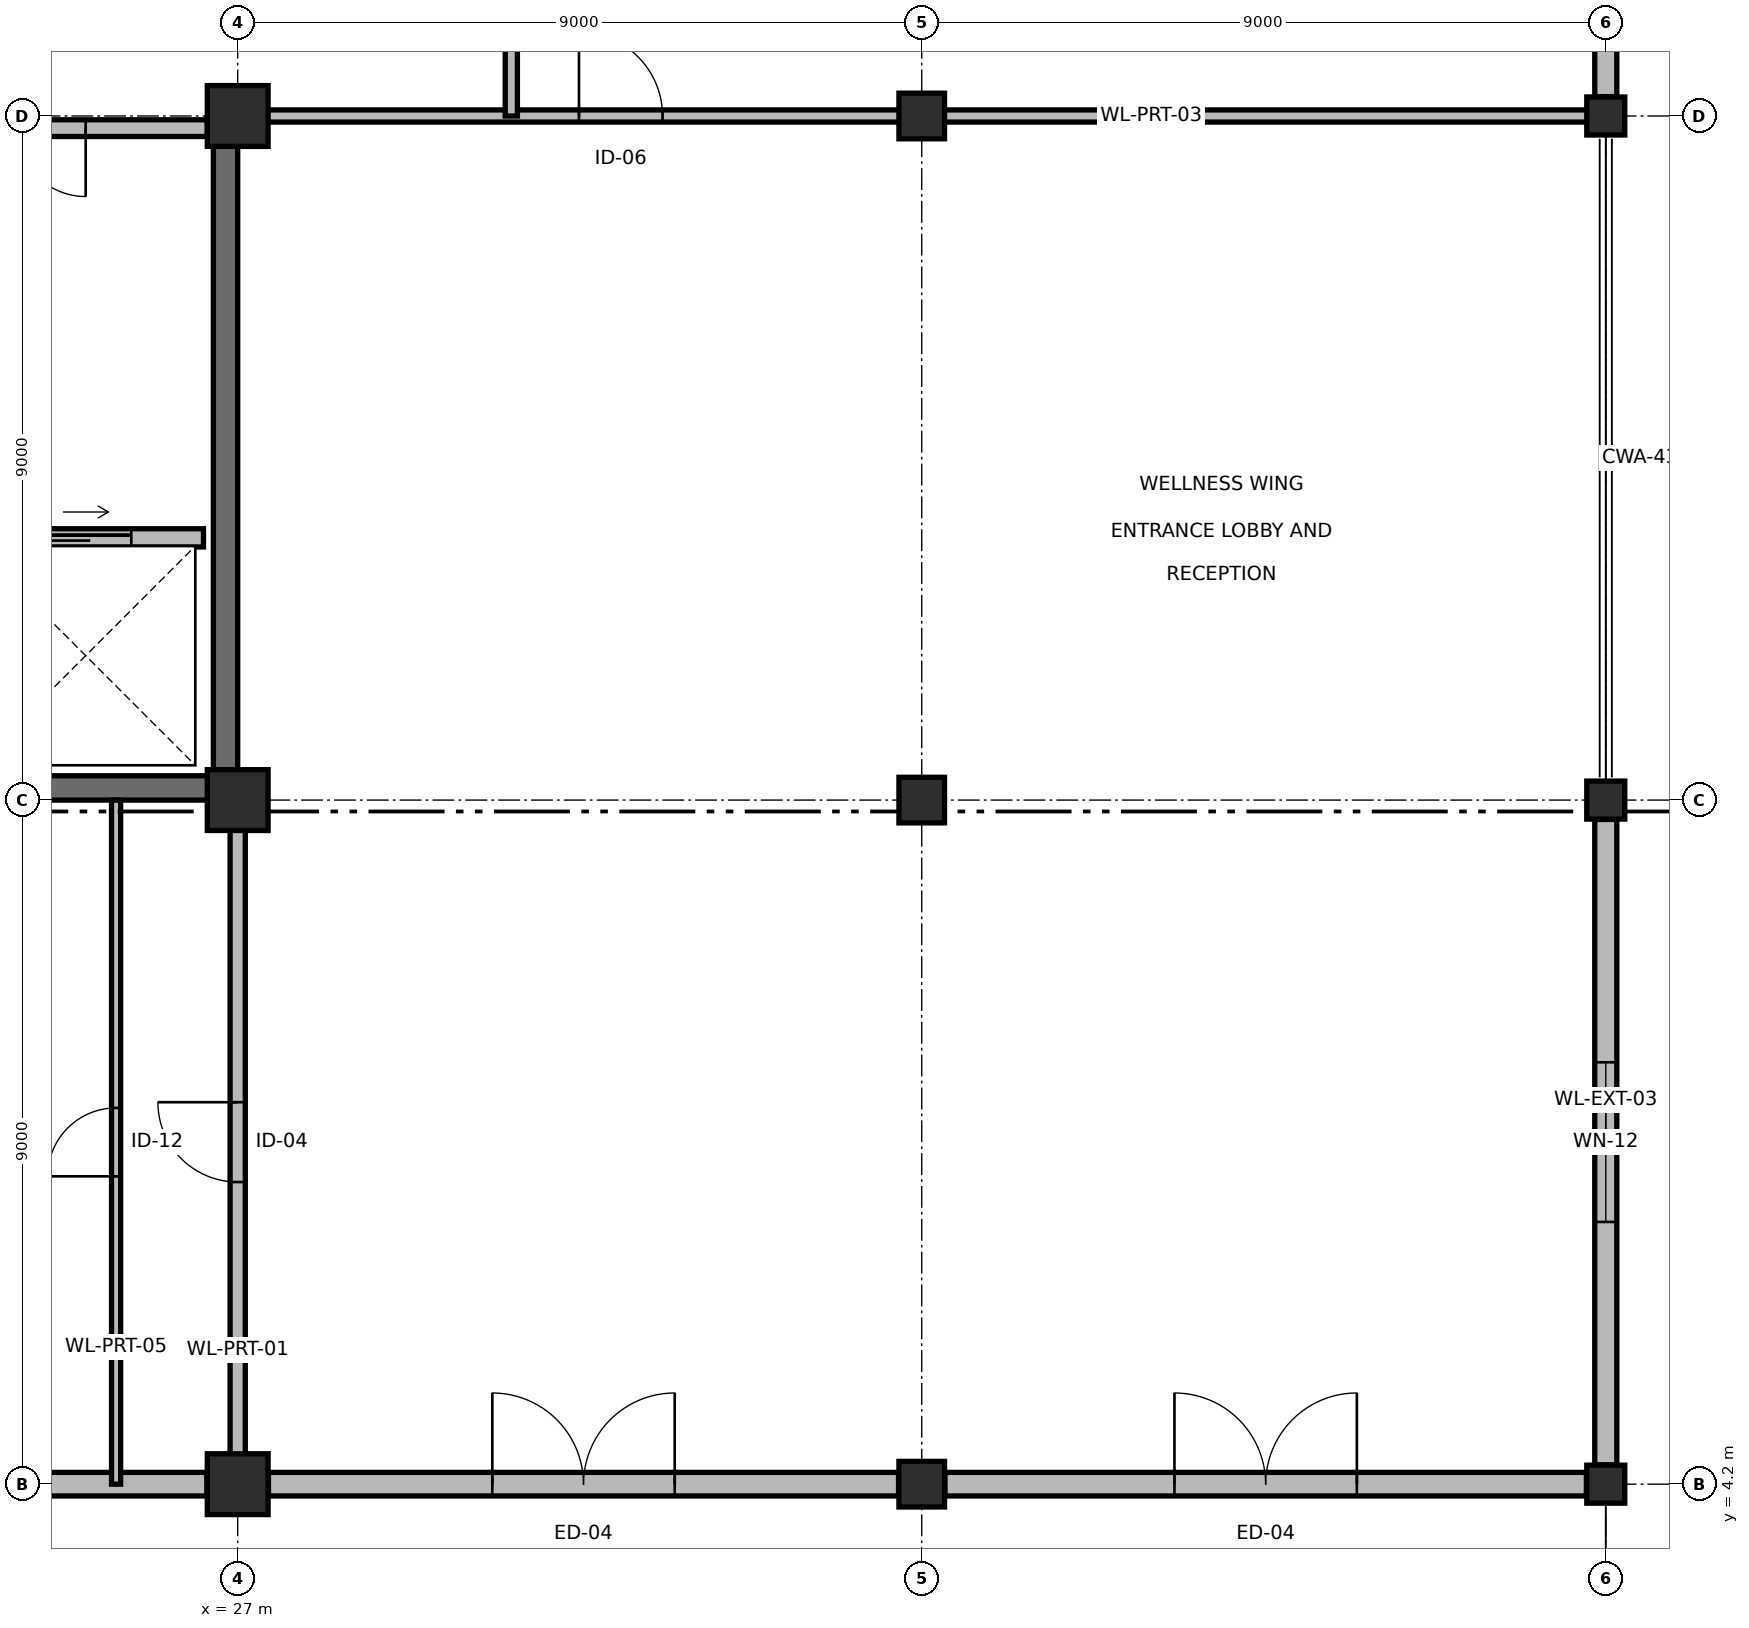
"""IFC4 building model, lengths in metres.
Left out: names, types, materials, properties, quantities, classifications, styles, units other than length and angle.
Written with IfcOpenShell. Run it as: python <this file> out.ifc"""

import sys

from ifc_helpers import new_model, si_unit, direction, frame, frame_2d, origin, origin_2d, place, context, subcontext, project, spatial, rectangle, extrude, element, fill, save


model = new_model("IFC4")
c1 = context("Model", 3, precision=1e-05, world=origin(), true_north=direction((0.0, 1.0)))
c2 = subcontext(c1, "Body", "Model", "MODEL_VIEW")
j1 = project(units=[si_unit("LENGTHUNIT", "METRE"), si_unit("PLANEANGLEUNIT", "RADIAN")], contexts=[c1])
p1 = place(None, origin())
s1 = spatial("IfcSite", under=j1, at=p1, CompositionType="ELEMENT")
p2 = place(p1, origin())
s2 = spatial("IfcBuilding", under=s1, at=p2, CompositionType="ELEMENT")
p3 = place(p2, origin())
s3 = spatial("IfcBuildingStorey", under=s2, at=p3, CompositionType="ELEMENT", Elevation=0.0)
for number, where, z_axis, x_axis in (
    (1, (27.0, 4.2, 0.0), (0.0, 0.0, 1.0), (1.0, 0.0, 0.0)),
    (2, (27.0, 13.2, 0.0), (0.0, 0.0, 1.0), (1.0, 0.0, 0.0)),
    (3, (27.0, 22.2, 0.0), (0.0, 0.0, 1.0), (1.0, 0.0, 0.0)),
):
    element("IfcColumn", number, at=place(p3, frame(where, z_axis=z_axis, x_axis=x_axis)), inside=s3, PredefinedType="COLUMN", context=c2, shape_type="SweptSolid", body=[
        extrude(rectangle(XDim=0.8, YDim=0.8, at=origin_2d()), origin(), (0.0, 0.0, 1.0), 4.8),
    ])
for number, where, z_axis, x_axis in (
    (4, (36.0, 4.2, 0.0), (0.0, 0.0, 1.0), (1.0, 0.0, 0.0)),
    (5, (36.0, 13.2, 0.0), (0.0, 0.0, 1.0), (1.0, 0.0, 0.0)),
    (6, (36.0, 22.2, 0.0), (0.0, 0.0, 1.0), (1.0, 0.0, 0.0)),
):
    element("IfcColumn", number, at=place(p3, frame(where, z_axis=z_axis, x_axis=x_axis)), inside=s3, PredefinedType="COLUMN", context=c2, shape_type="SweptSolid", body=[
        extrude(rectangle(XDim=0.6, YDim=0.6, at=origin_2d()), origin(), (0.0, 0.0, 1.0), 4.8),
    ])
for number, where, z_axis, x_axis in (
    (7, (45.0, 4.2, 0.0), (0.0, 0.0, 1.0), (1.0, 0.0, 0.0)),
    (8, (45.0, 13.2, 0.0), (0.0, 0.0, 1.0), (1.0, 0.0, 0.0)),
    (9, (45.0, 22.2, 0.0), (0.0, 0.0, 1.0), (1.0, 0.0, 0.0)),
):
    element("IfcColumn", number, at=place(p3, frame(where, z_axis=z_axis, x_axis=x_axis)), inside=s3, PredefinedType="COLUMN", context=c2, shape_type="SweptSolid", body=[
        extrude(rectangle(XDim=0.5, YDim=0.5, at=origin_2d()), origin(), (0.0, 0.0, 1.0), 4.8),
    ])
p4 = place(p3, frame((21.8, 13.36, 0.0), z_axis=(0.0, 0.0, 1.0), x_axis=(1.0, 0.0, 0.0)))
e10 = element("IfcWall", 10, at=p4, inside=s3, PredefinedType="SHEAR", context=c2, shape_type="SweptSolid", body=[
    extrude(rectangle(XDim=5.2, YDim=0.32, at=frame_2d((2.6, 0.0))), origin(), (0.0, 0.0, 1.0), 4.8),
])
p5 = place(p3, frame((26.84, 13.52, 0.0), z_axis=(0.0, 0.0, 1.0), x_axis=(0.0, 1.0, 0.0)))
e11 = element("IfcWall", 11, at=p5, inside=s3, PredefinedType="SHEAR", context=c2, shape_type="SweptSolid", body=[
    extrude(rectangle(XDim=8.48, YDim=0.32, at=frame_2d((4.24, 0.0))), origin(), (0.0, 0.0, 1.0), 4.8),
])
p6 = place(p3, frame((26.595, 4.2, 0.0), z_axis=(0.0, 0.0, 1.0), x_axis=(-1.0, 0.0, 0.0)))
e12 = element("IfcWall", 12, at=p6, inside=s3, PredefinedType="SOLIDWALL", context=c2, shape_type="SweptSolid", body=[
    extrude(rectangle(XDim=8.19, YDim=0.31, at=frame_2d((4.095, 0.0))), origin(), (0.0, 0.0, 1.0), 3.785),
])
p7 = place(p6, frame((2.595, 0.0, 0.85)))
e13 = element("IfcOpeningElement", 13, at=p7, cuts=e12, PredefinedType="OPENING", context=c2, shape_type="SweptSolid", body=[
    extrude(rectangle(XDim=3.0, YDim=2.0, at=frame_2d((1.5, 1.0))), frame((0.0, 0.165, 0.0), z_axis=(0.0, -1.0, 0.0), x_axis=(1.0, 0.0, 0.0)), (0.0, 0.0, 1.0), 0.33),
])
p8 = place(p3, frame((35.695, 4.2, 0.0), z_axis=(0.0, 0.0, 1.0), x_axis=(-1.0, 0.0, 0.0)))
e14 = element("IfcWall", 14, at=p8, inside=s3, PredefinedType="SOLIDWALL", context=c2, shape_type="SweptSolid", body=[
    extrude(rectangle(XDim=8.29, YDim=0.31, at=frame_2d((4.145, 0.0))), origin(), (0.0, 0.0, 1.0), 3.785),
])
p9 = place(p8, frame((2.945, 0.0, 0.0)))
e15 = element("IfcOpeningElement", 15, at=p9, cuts=e14, PredefinedType="OPENING", context=c2, shape_type="SweptSolid", body=[
    extrude(rectangle(XDim=2.4, YDim=2.4, at=frame_2d((1.2, 1.2))), frame((0.0, 0.165, 0.0), z_axis=(0.0, -1.0, 0.0), x_axis=(1.0, 0.0, 0.0)), (0.0, 0.0, 1.0), 0.33),
])
p10 = place(p3, frame((44.745, 4.2, 0.0), z_axis=(0.0, 0.0, 1.0), x_axis=(-1.0, 0.0, 0.0)))
e16 = element("IfcWall", 16, at=p10, inside=s3, PredefinedType="SOLIDWALL", context=c2, shape_type="SweptSolid", body=[
    extrude(rectangle(XDim=8.44, YDim=0.31, at=frame_2d((4.22, 0.0))), origin(), (0.0, 0.0, 1.0), 3.785),
])
p11 = place(p10, frame((3.02, 0.0, 0.0)))
e17 = element("IfcOpeningElement", 17, at=p11, cuts=e16, PredefinedType="OPENING", context=c2, shape_type="SweptSolid", body=[
    extrude(rectangle(XDim=2.4, YDim=2.4, at=frame_2d((1.2, 1.2))), frame((0.0, 0.165, 0.0), z_axis=(0.0, -1.0, 0.0), x_axis=(1.0, 0.0, 0.0)), (0.0, 0.0, 1.0), 0.33),
])
p12 = place(p3, frame((45.0, 12.945, 0.0), z_axis=(0.0, 0.0, 1.0), x_axis=(0.0, -1.0, 0.0)))
e18 = element("IfcWall", 18, at=p12, inside=s3, PredefinedType="SOLIDWALL", context=c2, shape_type="SweptSolid", body=[
    extrude(rectangle(XDim=8.49, YDim=0.29, at=frame_2d((4.245, 0.0))), origin(), (0.0, 0.0, 1.0), 3.785),
])
p13 = place(p12, frame((3.195, 0.0, 0.95)))
e19 = element("IfcOpeningElement", 19, at=p13, cuts=e18, PredefinedType="OPENING", context=c2, shape_type="SweptSolid", body=[
    extrude(rectangle(XDim=2.1, YDim=1.5, at=frame_2d((1.05, 0.75))), frame((0.0, 0.155, 0.0), z_axis=(0.0, -1.0, 0.0), x_axis=(1.0, 0.0, 0.0)), (0.0, 0.0, 1.0), 0.31),
])
p14 = place(p3, frame((45.0, 28.545, 0.0), z_axis=(0.0, 0.0, 1.0), x_axis=(0.0, -1.0, 0.0)))
e20 = element("IfcWall", 20, at=p14, inside=s3, PredefinedType="SOLIDWALL", context=c2, shape_type="SweptSolid", body=[
    extrude(rectangle(XDim=6.09, YDim=0.29, at=frame_2d((3.045, 0.0))), origin(), (0.0, 0.0, 1.0), 3.785),
])
p15 = place(p14, frame((1.995, 0.0, 0.0)))
e21 = element("IfcOpeningElement", 21, at=p15, cuts=e20, PredefinedType="OPENING", context=c2, shape_type="SweptSolid", body=[
    extrude(rectangle(XDim=2.1, YDim=2.4, at=frame_2d((1.05, 1.2))), frame((0.0, 0.155, 0.0), z_axis=(0.0, -1.0, 0.0), x_axis=(1.0, 0.0, 0.0)), (0.0, 0.0, 1.0), 0.31),
])
p16 = place(p3, frame((23.45, 16.65, 0.0), z_axis=(0.0, 0.0, 1.0), x_axis=(1.0, 0.0, 0.0)))
e22 = element("IfcWall", 22, at=p16, inside=s3, PredefinedType="SOLIDWALL", context=c2, shape_type="SweptSolid", body=[
    extrude(rectangle(XDim=3.1, YDim=0.24, at=frame_2d((1.55, 0.0))), origin(), (0.0, 0.0, 1.0), 4.505),
])
p17 = place(p16, frame((0.95, 0.0, 0.0)))
e23 = element("IfcOpeningElement", 23, at=p17, cuts=e22, PredefinedType="OPENING", context=c2, shape_type="SweptSolid", body=[
    extrude(rectangle(XDim=1.2, YDim=2.2, at=frame_2d((0.6, 1.1))), frame((0.0, 0.13, 0.0), z_axis=(0.0, -1.0, 0.0), x_axis=(1.0, 0.0, 0.0)), (0.0, 0.0, 1.0), 0.26),
])
p18 = place(p3, frame((22.1, 22.04, 0.0), z_axis=(0.0, 0.0, 1.0), x_axis=(1.0, 0.0, 0.0)))
e24 = element("IfcWall", 24, at=p18, inside=s3, PredefinedType="PARTITIONING", context=c2, shape_type="SweptSolid", body=[
    extrude(rectangle(XDim=4.5, YDim=0.22, at=frame_2d((2.25, 0.0))), origin(), (0.0, 0.0, 1.0), 3.835),
])
p19 = place(p18, frame((1.1, 0.0, 0.0)))
e25 = element("IfcOpeningElement", 25, at=p19, cuts=e24, PredefinedType="OPENING", context=c2, shape_type="SweptSolid", body=[
    extrude(rectangle(XDim=1.8, YDim=2.2, at=frame_2d((0.9, 1.1))), frame((0.0, 0.12, 0.0), z_axis=(0.0, -1.0, 0.0), x_axis=(1.0, 0.0, 0.0)), (0.0, 0.0, 1.0), 0.24),
])
p20 = place(p3, frame((27.0, 22.2, 0.0), z_axis=(0.0, 0.0, 1.0), x_axis=(1.0, 0.0, 0.0)))
e26 = element("IfcWall", 26, at=p20, inside=s3, PredefinedType="PARTITIONING", context=c2, shape_type="SweptSolid", body=[
    extrude(rectangle(XDim=18.0, YDim=0.16, at=frame_2d((9.0, 0.0))), origin(), (0.0, 0.0, 1.0), 3.785),
])
p21 = place(p20, frame((4.49, 0.0, 0.0)))
e27 = element("IfcOpeningElement", 27, at=p21, cuts=e26, PredefinedType="OPENING", context=c2, shape_type="SweptSolid", body=[
    extrude(rectangle(XDim=1.1, YDim=2.15, at=frame_2d((0.55, 1.075))), frame((0.0, 0.09, 0.0), z_axis=(0.0, -1.0, 0.0), x_axis=(1.0, 0.0, 0.0)), (0.0, 0.0, 1.0), 0.18),
])
p22 = place(p3, frame((25.4, 4.2, 0.0), z_axis=(0.0, 0.0, 1.0), x_axis=(0.0, 1.0, 0.0)))
e28 = element("IfcWall", 28, at=p22, inside=s3, PredefinedType="PARTITIONING", context=c2, shape_type="SweptSolid", body=[
    extrude(rectangle(XDim=9.0, YDim=0.12, at=frame_2d((4.5, 0.0))), origin(), (0.0, 0.0, 1.0), 3.785),
])
p23 = place(p22, frame((4.05, 0.0, 0.0)))
e29 = element("IfcOpeningElement", 29, at=p23, cuts=e28, PredefinedType="OPENING", context=c2, shape_type="SweptSolid", body=[
    extrude(rectangle(XDim=0.9, YDim=2.1, at=frame_2d((0.45, 1.05))), frame((0.0, 0.07, 0.0), z_axis=(0.0, -1.0, 0.0), x_axis=(1.0, 0.0, 0.0)), (0.0, 0.0, 1.0), 0.14),
])
p24 = place(p3, frame((27.0, 4.2, 0.0), z_axis=(0.0, 0.0, 1.0), x_axis=(0.0, 1.0, 0.0)))
e30 = element("IfcWall", 30, at=p24, inside=s3, PredefinedType="PARTITIONING", context=c2, shape_type="SweptSolid", body=[
    extrude(rectangle(XDim=9.0, YDim=0.2, at=frame_2d((4.5, 0.0))), origin(), (0.0, 0.0, 1.0), 3.835),
])
p25 = place(p24, frame((3.975, 0.0, 0.0)))
e31 = element("IfcOpeningElement", 31, at=p25, cuts=e30, PredefinedType="OPENING", context=c2, shape_type="SweptSolid", body=[
    extrude(rectangle(XDim=1.05, YDim=2.15, at=frame_2d((0.525, 1.075))), frame((0.0, 0.11, 0.0), z_axis=(0.0, -1.0, 0.0), x_axis=(1.0, 0.0, 0.0)), (0.0, 0.0, 1.0), 0.22),
])
p26 = place(p3, frame((30.6, 22.2, 0.0), z_axis=(0.0, 0.0, 1.0), x_axis=(0.0, 1.0, 0.0)))
e32 = element("IfcWall", 32, at=p26, inside=s3, PredefinedType="PARTITIONING", context=c2, shape_type="SweptSolid", body=[
    extrude(rectangle(XDim=18.6, YDim=0.16, at=frame_2d((9.3, 0.0))), origin(), (0.0, 0.0, 1.0), 3.835),
])
p27 = place(p26, frame((11.032, 0.0, 0.0)))
e33 = element("IfcOpeningElement", 33, at=p27, cuts=e32, PredefinedType="OPENING", context=c2, shape_type="SweptSolid", body=[
    extrude(rectangle(XDim=1.0, YDim=2.1, at=frame_2d((0.5, 1.05))), frame((0.0, 0.09, 0.0), z_axis=(0.0, -1.0, 0.0), x_axis=(1.0, 0.0, 0.0)), (0.0, 0.0, 1.0), 0.18),
])
p28 = place(p9, origin())
e34 = element("IfcDoor", 34, at=p28, inside=s3, OperationType="DOUBLE_DOOR_SINGLE_SWING", PredefinedType="DOOR", context=c2, shape_type="SweptSolid", body=[
    extrude(rectangle(XDim=2.4, YDim=2.4, at=frame_2d((1.2, 1.2))), frame((0.0, 0.025, 0.0), z_axis=(0.0, -1.0, 0.0), x_axis=(1.0, 0.0, 0.0)), (0.0, 0.0, 1.0), 0.05),
])
fill(e15, e34)
p29 = place(p11, origin())
e35 = element("IfcDoor", 35, at=p29, inside=s3, OperationType="DOUBLE_DOOR_SINGLE_SWING", PredefinedType="DOOR", context=c2, shape_type="SweptSolid", body=[
    extrude(rectangle(XDim=2.4, YDim=2.4, at=frame_2d((1.2, 1.2))), frame((0.0, 0.025, 0.0), z_axis=(0.0, -1.0, 0.0), x_axis=(1.0, 0.0, 0.0)), (0.0, 0.0, 1.0), 0.05),
])
fill(e17, e35)
p30 = place(p13, origin())
e36 = element("IfcWindow", 36, at=p30, inside=s3, PartitioningType="SINGLE_PANEL", PredefinedType="WINDOW", context=c2, shape_type="SweptSolid", body=[
    extrude(rectangle(XDim=2.1, YDim=1.5, at=frame_2d((1.05, 0.75))), frame((0.0, 0.03, 0.0), z_axis=(0.0, -1.0, 0.0), x_axis=(1.0, 0.0, 0.0)), (0.0, 0.0, 1.0), 0.06),
])
fill(e19, e36)
p31 = place(p17, origin())
e37 = element("IfcDoor", 37, at=p31, inside=s3, OperationType="DOUBLE_DOOR_SLIDING", PredefinedType="DOOR", context=c2, shape_type="SweptSolid", body=[
    extrude(rectangle(XDim=1.2, YDim=2.2, at=frame_2d((0.6, 1.1))), frame((0.0, 0.025, 0.0), z_axis=(0.0, -1.0, 0.0), x_axis=(1.0, 0.0, 0.0)), (0.0, 0.0, 1.0), 0.05),
])
fill(e23, e37)
p32 = place(p19, origin())
e38 = element("IfcDoor", 38, at=p32, inside=s3, OperationType="DOUBLE_DOOR_SINGLE_SWING", PredefinedType="DOOR", context=c2, shape_type="SweptSolid", body=[
    extrude(rectangle(XDim=1.8, YDim=2.2, at=frame_2d((0.9, 1.1))), frame((0.0, 0.025, 0.0), z_axis=(0.0, -1.0, 0.0), x_axis=(1.0, 0.0, 0.0)), (0.0, 0.0, 1.0), 0.05),
])
fill(e25, e38)
p33 = place(p21, origin())
e39 = element("IfcDoor", 39, at=p33, inside=s3, OperationType="SINGLE_SWING_LEFT", PredefinedType="DOOR", context=c2, shape_type="SweptSolid", body=[
    extrude(rectangle(XDim=1.1, YDim=2.15, at=frame_2d((0.55, 1.075))), frame((0.0, 0.025, 0.0), z_axis=(0.0, -1.0, 0.0), x_axis=(1.0, 0.0, 0.0)), (0.0, 0.0, 1.0), 0.05),
])
fill(e27, e39)
p34 = place(p23, origin())
e40 = element("IfcDoor", 40, at=p34, inside=s3, OperationType="SINGLE_SWING_LEFT", PredefinedType="DOOR", context=c2, shape_type="SweptSolid", body=[
    extrude(rectangle(XDim=0.9, YDim=2.1, at=frame_2d((0.45, 1.05))), frame((0.0, 0.025, 0.0), z_axis=(0.0, -1.0, 0.0), x_axis=(1.0, 0.0, 0.0)), (0.0, 0.0, 1.0), 0.05),
])
fill(e29, e40)
p35 = place(p25, origin())
e41 = element("IfcDoor", 41, at=p35, inside=s3, OperationType="SINGLE_SWING_RIGHT", PredefinedType="DOOR", context=c2, shape_type="SweptSolid", body=[
    extrude(rectangle(XDim=1.05, YDim=2.15, at=frame_2d((0.525, 1.075))), frame((0.0, 0.025, 0.0), z_axis=(0.0, -1.0, 0.0), x_axis=(1.0, 0.0, 0.0)), (0.0, 0.0, 1.0), 0.05),
])
fill(e31, e41)
save(model, sys.argv[1])
